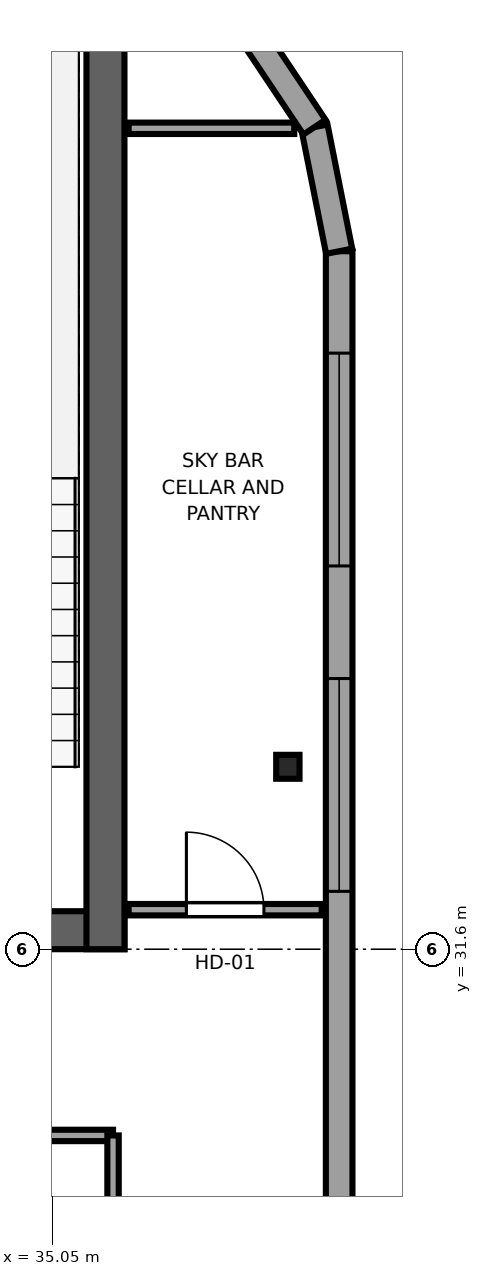
"""IFC4 building model, lengths in metres.
Left out: names, types, materials, properties, quantities, classifications, styles, units other than length and angle.
Written with IfcOpenShell. Run it as: python <this file> out.ifc"""

import sys

from ifc_helpers import new_model, si_unit, direction, frame, frame_2d, origin, origin_2d, place, context, subcontext, project, spatial, rectangle, i_section, extrude, source, transform, mapped, element, fill, save


model = new_model("IFC4")
c1 = context("Model", 3, precision=1e-05, world=origin(), true_north=direction((0.0, 1.0)))
c2 = subcontext(c1, "Body", "Model", "MODEL_VIEW")
j1 = project(units=[si_unit("LENGTHUNIT", "METRE"), si_unit("PLANEANGLEUNIT", "RADIAN")], contexts=[c1])
p1 = place(None, origin())
s1 = spatial("IfcSite", under=j1, at=p1, CompositionType="ELEMENT")
p2 = place(p1, origin())
s2 = spatial("IfcBuilding", under=s1, at=p2, CompositionType="ELEMENT")
p3 = place(p2, frame((0.0, 0.0, 286.55)))
s3 = spatial("IfcBuildingStorey", under=s2, at=p3, CompositionType="ELEMENT", Elevation=286.55)
p4 = place(p3, frame((10.0, 31.85, 0.0), z_axis=(0.0, 0.0, 1.0), x_axis=(1.0, 0.0, 0.0)))
e1 = element("IfcWall", 1, at=p4, inside=s3, PredefinedType="SHEAR", context=c2, shape_type="SweptSolid", body=[
    extrude(rectangle(XDim=26.0, YDim=0.5, at=frame_2d((13.0, 0.0))), origin(), (0.0, 0.0, 1.0), 4.4),
])
p5 = place(p4, frame((7.45, 0.0, 0.0), z_axis=(0.0, 0.0, 1.0), x_axis=(-1.0, 0.0, 0.0)))
e2 = element("IfcOpeningElement", 2, at=p5, cuts=e1, PredefinedType="OPENING", context=c2, shape_type="SweptSolid", body=[
    extrude(rectangle(XDim=1.5, YDim=2.04, at=frame_2d((0.75, 1.02))), frame((0.0, 0.26, 0.0), z_axis=(0.0, -1.0, 0.0), x_axis=(1.0, 0.0, 0.0)), (0.0, 0.0, 1.0), 0.52),
])
p6 = place(p4, frame((13.75, 0.0, 0.0), z_axis=(0.0, 0.0, 1.0), x_axis=(-1.0, 0.0, 0.0)))
e3 = element("IfcOpeningElement", 3, at=p6, cuts=e1, PredefinedType="OPENING", context=c2, shape_type="SweptSolid", body=[
    extrude(rectangle(XDim=1.5, YDim=2.04, at=frame_2d((0.75, 1.02))), frame((0.0, 0.26, 0.0), z_axis=(0.0, -1.0, 0.0), x_axis=(1.0, 0.0, 0.0)), (0.0, 0.0, 1.0), 0.52),
])
p7 = place(p4, frame((20.05, 0.0, 0.0), z_axis=(0.0, 0.0, 1.0), x_axis=(-1.0, 0.0, 0.0)))
e4 = element("IfcOpeningElement", 4, at=p7, cuts=e1, PredefinedType="OPENING", context=c2, shape_type="SweptSolid", body=[
    extrude(rectangle(XDim=1.5, YDim=2.04, at=frame_2d((0.75, 1.02))), frame((0.0, 0.26, 0.0), z_axis=(0.0, -1.0, 0.0), x_axis=(1.0, 0.0, 0.0)), (0.0, 0.0, 1.0), 0.52),
])
p8 = place(p3, frame((35.75, 31.6, 0.0), z_axis=(0.0, 0.0, 1.0), x_axis=(0.0, 1.0, 0.0)))
e5 = element("IfcWall", 5, at=p8, inside=s3, PredefinedType="SHEAR", context=c2, shape_type="SweptSolid", body=[
    extrude(rectangle(XDim=13.6, YDim=0.5, at=frame_2d((6.8, 0.0))), origin(), (0.0, 0.0, 1.0), 4.4),
])
m1 = source(origin(), c2, "Body", "SweptSolid", [
    extrude(i_section(OverallWidth=0.307, OverallDepth=0.315, WebThickness=0.012, FlangeThickness=0.019, FilletRadius=0.017, at=origin_2d()), origin(), (0.0, 0.0, 1.0), 4.4),
])
p9 = place(p3, frame((38.15, 34.0, 0.0), z_axis=(0.0, 0.0, 1.0), x_axis=(1.0, 0.0, 0.0)))
e6 = element("IfcColumn", 6, at=p9, inside=s3, PredefinedType="COLUMN", context=c2, shape_type="MappedRepresentation", body=[
    mapped(m1, transform((0.0, 0.0, 0.0), x_axis=(1.0, 0.0, 0.0), y_axis=(0.0, 1.0, 0.0), z_axis=(0.0, 0.0, 1.0), scale=1.0)),
])
p10 = place(p3, frame((38.825, 9.617, 0.0), z_axis=(0.0, 0.0, 1.0), x_axis=(0.0, 1.0, 0.0)))
e7 = element("IfcWall", 7, at=p10, inside=s3, PredefinedType="SOLIDWALL", context=c2, shape_type="SweptSolid", body=[
    extrude(rectangle(XDim=31.166, YDim=0.35, at=frame_2d((15.583, 0.0))), origin(), (0.0, 0.0, 1.0), 4.14),
])
p11 = place(p10, frame((1.34, 0.0, 0.62)))
e8 = element("IfcOpeningElement", 8, at=p11, cuts=e7, PredefinedType="OPENING", context=c2, shape_type="SweptSolid", body=[
    extrude(rectangle(XDim=2.8, YDim=2.25, at=frame_2d((1.4, 1.125))), frame((0.0, 0.185, 0.0), z_axis=(0.0, -1.0, 0.0), x_axis=(1.0, 0.0, 0.0)), (0.0, 0.0, 1.0), 0.37),
])
p12 = place(p10, frame((9.902, 0.0, 0.62)))
e9 = element("IfcOpeningElement", 9, at=p12, cuts=e7, PredefinedType="OPENING", context=c2, shape_type="SweptSolid", body=[
    extrude(rectangle(XDim=2.8, YDim=2.25, at=frame_2d((1.4, 1.125))), frame((0.0, 0.185, 0.0), z_axis=(0.0, -1.0, 0.0), x_axis=(1.0, 0.0, 0.0)), (0.0, 0.0, 1.0), 0.37),
])
p13 = place(p10, frame((15.233, 0.0, 0.62)))
e10 = element("IfcOpeningElement", 10, at=p13, cuts=e7, PredefinedType="OPENING", context=c2, shape_type="SweptSolid", body=[
    extrude(rectangle(XDim=2.8, YDim=2.25, at=frame_2d((1.4, 1.125))), frame((0.0, 0.185, 0.0), z_axis=(0.0, -1.0, 0.0), x_axis=(1.0, 0.0, 0.0)), (0.0, 0.0, 1.0), 0.37),
])
p14 = place(p10, frame((22.744, 0.0, 0.62)))
e11 = element("IfcOpeningElement", 11, at=p14, cuts=e7, PredefinedType="OPENING", context=c2, shape_type="SweptSolid", body=[
    extrude(rectangle(XDim=2.8, YDim=2.25, at=frame_2d((1.4, 1.125))), frame((0.0, 0.185, 0.0), z_axis=(0.0, -1.0, 0.0), x_axis=(1.0, 0.0, 0.0)), (0.0, 0.0, 1.0), 0.37),
])
p15 = place(p10, frame((27.025, 0.0, 0.62)))
e12 = element("IfcOpeningElement", 12, at=p15, cuts=e7, PredefinedType="OPENING", context=c2, shape_type="SweptSolid", body=[
    extrude(rectangle(XDim=2.8, YDim=2.25, at=frame_2d((1.4, 1.125))), frame((0.0, 0.185, 0.0), z_axis=(0.0, -1.0, 0.0), x_axis=(1.0, 0.0, 0.0)), (0.0, 0.0, 1.0), 0.37),
])
p16 = place(p3, frame((38.825, 40.783, 0.0), z_axis=(0.0, 0.0, 1.0), x_axis=(-0.195044345786, 0.980794424524, 0.0)))
e13 = element("IfcWall", 13, at=p16, inside=s3, PredefinedType="SOLIDWALL", context=c2, shape_type="SweptSolid", body=[
    extrude(rectangle(XDim=1.665, YDim=0.35, at=frame_2d((0.833, 0.0))), origin(), (0.0, 0.0, 1.0), 4.14),
])
p17 = place(p3, frame((38.5, 42.416, 0.0), z_axis=(0.0, 0.0, 1.0), x_axis=(-0.555520825599, 0.831502623162, 0.0)))
e14 = element("IfcWall", 14, at=p17, inside=s3, PredefinedType="SOLIDWALL", context=c2, shape_type="SweptSolid", body=[
    extrude(rectangle(XDim=1.647, YDim=0.35, at=frame_2d((0.824, 0.0))), origin(), (0.0, 0.0, 1.0), 4.14),
])
p18 = place(p3, frame((24.3, 29.15, 0.0), z_axis=(0.0, 0.0, 1.0), x_axis=(1.0, 0.0, 0.0)))
e15 = element("IfcWall", 15, at=p18, inside=s3, PredefinedType="PARTITIONING", context=c2, shape_type="SweptSolid", body=[
    extrude(rectangle(XDim=11.55, YDim=0.15, at=frame_2d((5.775, 0.0))), origin(), (0.0, 0.0, 1.0), 4.14),
])
p19 = place(p3, frame((35.85, 26.45, 0.0), z_axis=(0.0, 0.0, 1.0), x_axis=(0.0, 1.0, 0.0)))
e16 = element("IfcWall", 16, at=p19, inside=s3, PredefinedType="PARTITIONING", context=c2, shape_type="SweptSolid", body=[
    extrude(rectangle(XDim=2.7, YDim=0.15, at=frame_2d((1.35, 0.0))), origin(), (0.0, 0.0, 1.0), 4.14),
])
p20 = place(p3, frame((36.055, 32.12, 0.0), z_axis=(0.0, 0.0, 1.0), x_axis=(1.0, 0.0, 0.0)))
e17 = element("IfcWall", 17, at=p20, inside=s3, PredefinedType="PARTITIONING", context=c2, shape_type="SweptSolid", body=[
    extrude(rectangle(XDim=2.54, YDim=0.15, at=frame_2d((1.27, 0.0))), origin(), (0.0, 0.0, 1.0), 4.14),
])
p21 = place(p20, frame((0.76, 0.0, 0.0)))
e18 = element("IfcOpeningElement", 18, at=p21, cuts=e17, PredefinedType="OPENING", context=c2, shape_type="SweptSolid", body=[
    extrude(rectangle(XDim=1.02, YDim=2.03, at=frame_2d((0.51, 1.015))), frame((0.0, 0.085, 0.0), z_axis=(0.0, -1.0, 0.0), x_axis=(1.0, 0.0, 0.0)), (0.0, 0.0, 1.0), 0.17),
])
p22 = place(p3, frame((36.055, 42.4, 0.0), z_axis=(0.0, 0.0, 1.0), x_axis=(1.0, 0.0, 0.0)))
e19 = element("IfcWall", 19, at=p22, inside=s3, PredefinedType="PARTITIONING", context=c2, shape_type="SweptSolid", body=[
    extrude(rectangle(XDim=2.179, YDim=0.15, at=frame_2d((1.089, 0.0))), origin(), (0.0, 0.0, 1.0), 4.14),
])
m2 = source(origin(), c2, "Body", "SweptSolid", [
    extrude(rectangle(XDim=2.8, YDim=2.25, at=frame_2d((1.4, 1.125))), frame((0.0, 0.09, 0.0), z_axis=(0.0, -1.0, 0.0), x_axis=(1.0, 0.0, 0.0)), (0.0, 0.0, 1.0), 0.06),
])
p23 = place(p14, origin())
e20 = element("IfcWindow", 20, at=p23, inside=s3, PartitioningType="TRIPLE_PANEL_HORIZONTAL", PredefinedType="WINDOW", context=c2, shape_type="MappedRepresentation", body=[
    mapped(m2, transform((0.0, 0.0, 0.0), x_axis=(1.0, 0.0, 0.0), y_axis=(0.0, 1.0, 0.0), z_axis=(0.0, 0.0, 1.0), scale=1.0)),
])
fill(e11, e20)
p24 = place(p15, origin())
e21 = element("IfcWindow", 21, at=p24, inside=s3, PartitioningType="TRIPLE_PANEL_HORIZONTAL", PredefinedType="WINDOW", context=c2, shape_type="MappedRepresentation", body=[
    mapped(m2, transform((0.0, 0.0, 0.0), x_axis=(1.0, 0.0, 0.0), y_axis=(0.0, 1.0, 0.0), z_axis=(0.0, 0.0, 1.0), scale=1.0)),
])
fill(e12, e21)
m3 = source(origin(), c2, "Body", "SweptSolid", [
    extrude(rectangle(XDim=1.02, YDim=2.03, at=frame_2d((0.51, 1.015))), frame((0.0, 0.025, 0.0), z_axis=(0.0, -1.0, 0.0), x_axis=(1.0, 0.0, 0.0)), (0.0, 0.0, 1.0), 0.05),
])
p25 = place(p21, origin())
e22 = element("IfcDoor", 22, at=p25, inside=s3, OperationType="SINGLE_SWING_LEFT", PredefinedType="DOOR", context=c2, shape_type="MappedRepresentation", body=[
    mapped(m3, transform((0.0, 0.0, 0.0), x_axis=(1.0, 0.0, 0.0), y_axis=(0.0, 1.0, 0.0), z_axis=(0.0, 0.0, 1.0), scale=1.0)),
])
fill(e18, e22)
save(model, sys.argv[1])
